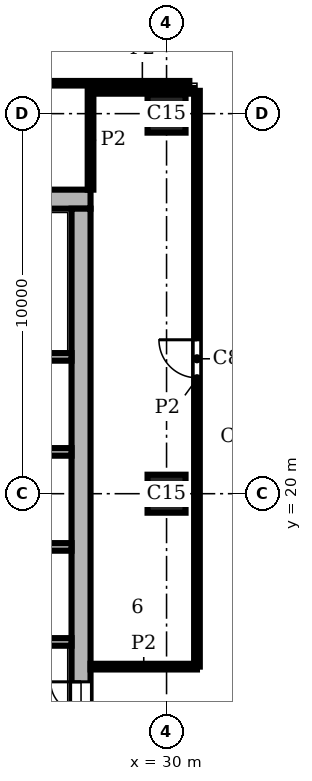
"""IFC4 building model, lengths in metres.
Left out: names, types, materials, properties, quantities, classifications, styles, units other than length and angle.
Written with IfcOpenShell. Run it as: python <this file> out.ifc"""

import sys

from ifc_helpers import new_model, si_unit, direction, frame, frame_2d, origin, origin_2d, place, context, subcontext, project, spatial, rectangle, extrude, element, fill, save


model = new_model("IFC4")
c1 = context("Model", 3, precision=1e-05, world=origin(), true_north=direction((0.0, 1.0)))
c2 = subcontext(c1, "Body", "Model", "MODEL_VIEW")
j1 = project(units=[si_unit("LENGTHUNIT", "METRE"), si_unit("PLANEANGLEUNIT", "RADIAN")], contexts=[c1])
p1 = place(None, origin())
s1 = spatial("IfcSite", under=j1, at=p1, CompositionType="ELEMENT")
p2 = place(p1, origin())
s2 = spatial("IfcBuilding", under=s1, at=p2, CompositionType="ELEMENT")
p3 = place(p2, frame((0.0, 0.0, 317.7)))
s3 = spatial("IfcBuildingStorey", under=s2, at=p3, CompositionType="ELEMENT", Elevation=317.7)
for number, where, z_axis, x_axis in (
    (1, (30.0, 20.0, 0.0), (0.0, 0.0, 1.0), (1.0, 0.0, 0.0)),
    (2, (30.0, 30.0, 0.0), (0.0, 0.0, 1.0), (1.0, 0.0, 0.0)),
):
    element("IfcColumn", number, at=place(p3, frame(where, z_axis=z_axis, x_axis=x_axis)), inside=s3, PredefinedType="COLUMN", context=c2, shape_type="SweptSolid", body=[
        extrude(rectangle(XDim=1.0, YDim=1.0, at=origin_2d()), origin(), (0.0, 0.0, 1.0), 3.9),
    ])
p4 = place(p3, frame((27.75, 8.5, 0.0), z_axis=(0.0, 0.0, 1.0), x_axis=(0.0, 1.0, 0.0)))
e3 = element("IfcWall", 3, at=p4, inside=s3, PredefinedType="SHEAR", context=c2, shape_type="SweptSolid", body=[
    extrude(rectangle(XDim=19.0, YDim=0.5, at=frame_2d((9.5, 0.0))), origin(), (0.0, 0.0, 1.0), 3.9),
])
p5 = place(p4, frame((4.95, 0.0, 0.0)))
e4 = element("IfcOpeningElement", 4, at=p5, cuts=e3, PredefinedType="OPENING", context=c2, shape_type="SweptSolid", body=[
    extrude(rectangle(XDim=1.6, YDim=2.1, at=frame_2d((0.8, 1.05))), frame((0.0, 0.26, 0.0), z_axis=(0.0, -1.0, 0.0), x_axis=(1.0, 0.0, 0.0)), (0.0, 0.0, 1.0), 0.52),
])
p6 = place(p3, frame((28.0, 27.75, 0.0), z_axis=(0.0, 0.0, 1.0), x_axis=(-1.0, 0.0, 0.0)))
e5 = element("IfcWall", 5, at=p6, inside=s3, PredefinedType="SHEAR", context=c2, shape_type="SweptSolid", body=[
    extrude(rectangle(XDim=20.0, YDim=0.5, at=frame_2d((10.0, 0.0))), origin(), (0.0, 0.0, 1.0), 3.9),
])
for number, where, z_axis, x_axis in (
    (6, (24.3, 16.1, 0.0), (0.0, 0.0, 1.0), (1.0, 0.0, 0.0)),
    (7, (24.3, 18.6, 0.0), (0.0, 0.0, 1.0), (1.0, 0.0, 0.0)),
    (8, (24.3, 21.1, 0.0), (0.0, 0.0, 1.0), (1.0, 0.0, 0.0)),
):
    element("IfcWall", number, at=place(p3, frame(where, z_axis=z_axis, x_axis=x_axis)), inside=s3, PredefinedType="SHEAR", context=c2, shape_type="SweptSolid", body=[
        extrude(rectangle(XDim=3.2, YDim=0.2, at=frame_2d((1.6, 0.0))), origin(), (0.0, 0.0, 1.0), 3.58),
    ])
p7 = place(p3, frame((13.8, 23.6, 0.0), z_axis=(0.0, 0.0, 1.0), x_axis=(1.0, 0.0, 0.0)))
e9 = element("IfcWall", 9, at=p7, inside=s3, PredefinedType="SHEAR", context=c2, shape_type="SweptSolid", body=[
    extrude(rectangle(XDim=13.7, YDim=0.2, at=frame_2d((6.85, 0.0))), origin(), (0.0, 0.0, 1.0), 3.58),
])
p8 = place(p7, frame((2.4, 0.0, 0.0)))
e10 = element("IfcOpeningElement", 10, at=p8, cuts=e9, PredefinedType="OPENING", context=c2, shape_type="SweptSolid", body=[
    extrude(rectangle(XDim=1.1, YDim=2.1, at=frame_2d((0.55, 1.05))), frame((0.0, 0.11, 0.0), z_axis=(0.0, -1.0, 0.0), x_axis=(1.0, 0.0, 0.0)), (0.0, 0.0, 1.0), 0.22),
])
p9 = place(p7, frame((4.9, 0.0, 0.0)))
e11 = element("IfcOpeningElement", 11, at=p9, cuts=e9, PredefinedType="OPENING", context=c2, shape_type="SweptSolid", body=[
    extrude(rectangle(XDim=1.1, YDim=2.1, at=frame_2d((0.55, 1.05))), frame((0.0, 0.11, 0.0), z_axis=(0.0, -1.0, 0.0), x_axis=(1.0, 0.0, 0.0)), (0.0, 0.0, 1.0), 0.22),
])
p10 = place(p7, frame((0.15, 0.0, 0.0)))
e12 = element("IfcOpeningElement", 12, at=p10, cuts=e9, PredefinedType="OPENING", context=c2, shape_type="SweptSolid", body=[
    extrude(rectangle(XDim=1.0, YDim=2.1, at=frame_2d((0.5, 1.05))), frame((0.0, 0.11, 0.0), z_axis=(0.0, -1.0, 0.0), x_axis=(1.0, 0.0, 0.0)), (0.0, 0.0, 1.0), 0.22),
])
p11 = place(p3, frame((28.0, 28.0, 0.0), z_axis=(0.0, 0.0, 1.0), x_axis=(0.0, 1.0, 0.0)))
e13 = element("IfcWall", 13, at=p11, inside=s3, PredefinedType="PARTITIONING", context=c2, shape_type="SweptSolid", body=[
    extrude(rectangle(XDim=2.598, YDim=0.15, at=frame_2d((1.299, 0.0))), origin(), (0.0, 0.0, 1.0), 3.58),
])
p12 = place(p3, frame((30.8, 15.45, 0.0), z_axis=(0.0, 0.0, 1.0), x_axis=(0.0, 1.0, 0.0)))
e14 = element("IfcWall", 14, at=p12, inside=s3, PredefinedType="PARTITIONING", context=c2, shape_type="SweptSolid", body=[
    extrude(rectangle(XDim=15.15, YDim=0.15, at=frame_2d((7.575, 0.0))), origin(), (0.0, 0.0, 1.0), 3.58),
])
p13 = place(p12, frame((7.6, 0.0, 0.0)))
e15 = element("IfcOpeningElement", 15, at=p13, cuts=e14, PredefinedType="OPENING", context=c2, shape_type="SweptSolid", body=[
    extrude(rectangle(XDim=1.0, YDim=2.1, at=frame_2d((0.5, 1.05))), frame((0.0, 0.085, 0.0), z_axis=(0.0, -1.0, 0.0), x_axis=(1.0, 0.0, 0.0)), (0.0, 0.0, 1.0), 0.17),
])
p14 = place(p3, frame((28.0, 15.45, 0.0), z_axis=(0.0, 0.0, 1.0), x_axis=(1.0, 0.0, 0.0)))
e16 = element("IfcWall", 16, at=p14, inside=s3, PredefinedType="PARTITIONING", context=c2, shape_type="SweptSolid", body=[
    extrude(rectangle(XDim=2.8, YDim=0.15, at=frame_2d((1.4, 0.0))), origin(), (0.0, 0.0, 1.0), 3.58),
])
p15 = place(p3, frame((28.002, 30.6, 0.0), z_axis=(0.0, 0.0, 1.0), x_axis=(1.0, 0.0, 0.0)))
e17 = element("IfcWall", 17, at=p15, inside=s3, PredefinedType="PARTITIONING", context=c2, shape_type="SweptSolid", body=[
    extrude(rectangle(XDim=2.723, YDim=0.15, at=frame_2d((1.362, 0.0))), origin(), (0.0, 0.0, 1.0), 3.58),
])
p16 = place(p3, frame((13.802, 30.8, 0.0), z_axis=(0.0, 0.0, 1.0), x_axis=(1.0, 0.0, 0.0)))
e18 = element("IfcWall", 18, at=p16, inside=s3, PredefinedType="PARTITIONING", context=c2, shape_type="SweptSolid", body=[
    extrude(rectangle(XDim=16.798, YDim=0.12, at=frame_2d((8.399, 0.0))), origin(), (0.0, 0.0, 1.0), 3.58),
])
p17 = place(p16, frame((10.1, 0.0, 0.0)))
e19 = element("IfcOpeningElement", 19, at=p17, cuts=e18, PredefinedType="OPENING", context=c2, shape_type="SweptSolid", body=[
    extrude(rectangle(XDim=1.0, YDim=2.1, at=frame_2d((0.5, 1.05))), frame((0.0, 0.07, 0.0), z_axis=(0.0, -1.0, 0.0), x_axis=(1.0, 0.0, 0.0)), (0.0, 0.0, 1.0), 0.14),
])
p18 = place(p5, origin())
e20 = element("IfcDoor", 20, at=p18, inside=s3, OperationType="DOUBLE_DOOR_SINGLE_SWING", PredefinedType="DOOR", context=c2, shape_type="SweptSolid", body=[
    extrude(rectangle(XDim=1.6, YDim=2.1, at=frame_2d((0.8, 1.05))), frame((0.0, 0.025, 0.0), z_axis=(0.0, -1.0, 0.0), x_axis=(1.0, 0.0, 0.0)), (0.0, 0.0, 1.0), 0.05),
])
fill(e4, e20)
p19 = place(p13, origin())
e21 = element("IfcDoor", 21, at=p19, inside=s3, OperationType="SINGLE_SWING_RIGHT", PredefinedType="DOOR", context=c2, shape_type="SweptSolid", body=[
    extrude(rectangle(XDim=1.0, YDim=2.1, at=frame_2d((0.5, 1.05))), frame((0.0, 0.025, 0.0), z_axis=(0.0, -1.0, 0.0), x_axis=(1.0, 0.0, 0.0)), (0.0, 0.0, 1.0), 0.05),
])
fill(e15, e21)
save(model, sys.argv[1])
